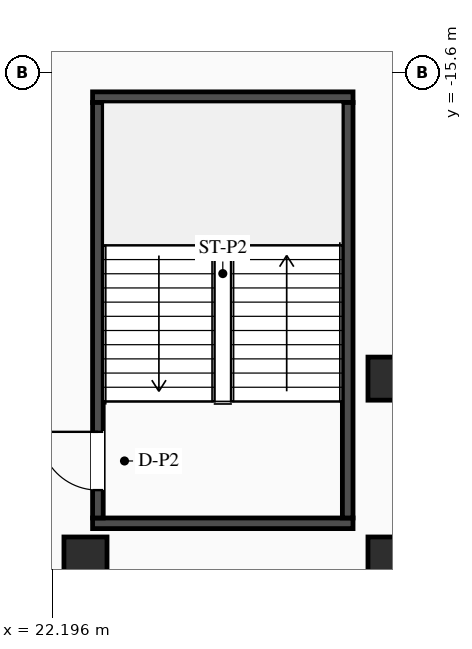
"""IFC4 building model, lengths in metres.
Left out: names, types, materials, properties, quantities, classifications, styles, units other than length and angle.
Written with IfcOpenShell. Run it as: python <this file> out.ifc"""

import sys

from ifc_helpers import new_model, si_unit, direction, frame, frame_2d, origin, origin_2d, place, context, subcontext, project, spatial, rectangle, i_section, extrude, element, fill, save


model = new_model("IFC4")
c1 = context("Model", 3, precision=1e-05, world=origin(), true_north=direction((0.0, 1.0)))
c2 = subcontext(c1, "Body", "Model", "MODEL_VIEW")
j1 = project(units=[si_unit("LENGTHUNIT", "METRE"), si_unit("PLANEANGLEUNIT", "RADIAN")], contexts=[c1])
p1 = place(None, origin())
s1 = spatial("IfcSite", under=j1, at=p1, CompositionType="ELEMENT")
p2 = place(p1, origin())
s2 = spatial("IfcBuilding", under=s1, at=p2, CompositionType="ELEMENT")
p3 = place(p2, frame((0.0, 0.0, 5.1)))
s3 = spatial("IfcBuildingStorey", under=s2, at=p3, CompositionType="ELEMENT", Elevation=5.1)
for number, where, z_axis, x_axis in (
    (1, (22.99, -24.505, 0.0), (0.0, 0.0, 1.0), (1.0, 0.0, 0.0)),
    (2, (22.99, -16.095, 0.0), (0.0, 0.0, 1.0), (1.0, 0.0, 0.0)),
):
    element("IfcWall", number, at=place(p3, frame(where, z_axis=z_axis, x_axis=x_axis)), inside=s3, PredefinedType="SHEAR", context=c2, shape_type="SweptSolid", body=[
        extrude(rectangle(XDim=5.14, YDim=0.21, at=frame_2d((2.57, 0.0))), origin(), (0.0, 0.0, 1.0), 4.25),
    ])
p4 = place(p3, frame((23.095, -24.4, 0.0), z_axis=(0.0, 0.0, 1.0), x_axis=(0.0, 1.0, 0.0)))
e3 = element("IfcWall", 3, at=p4, inside=s3, PredefinedType="SHEAR", context=c2, shape_type="SweptSolid", body=[
    extrude(rectangle(XDim=8.2, YDim=0.21, at=frame_2d((4.1, 0.0))), origin(), (0.0, 0.0, 1.0), 4.25),
])
p5 = place(p4, frame((0.55, 0.0, 0.0)))
e4 = element("IfcOpeningElement", 4, at=p5, cuts=e3, PredefinedType="OPENING", context=c2, shape_type="SweptSolid", body=[
    extrude(rectangle(XDim=1.15, YDim=2.1, at=frame_2d((0.575, 1.05))), frame((0.0, 0.115, 0.0), z_axis=(0.0, -1.0, 0.0), x_axis=(1.0, 0.0, 0.0)), (0.0, 0.0, 1.0), 0.23),
])
p6 = place(p3, frame((28.025, -24.4, 0.0), z_axis=(0.0, 0.0, 1.0), x_axis=(0.0, 1.0, 0.0)))
e5 = element("IfcWall", 5, at=p6, inside=s3, PredefinedType="SHEAR", context=c2, shape_type="SweptSolid", body=[
    extrude(rectangle(XDim=8.2, YDim=0.21, at=frame_2d((4.1, 0.0))), origin(), (0.0, 0.0, 1.0), 4.25),
])
for number, where, z_axis, x_axis in (
    (6, (28.85, -21.65, 0.0), (0.0, 0.0, 1.0), (1.0, 0.0, 0.0)),
    (7, (22.85, -25.2, 0.0), (0.0, 0.0, 1.0), (1.0, 0.0, 0.0)),
    (8, (28.85, -25.2, 0.0), (0.0, 0.0, 1.0), (1.0, 0.0, 0.0)),
):
    element("IfcColumn", number, at=place(p3, frame(where, z_axis=z_axis, x_axis=x_axis)), inside=s3, PredefinedType="COLUMN", context=c2, shape_type="SweptSolid", body=[
        extrude(i_section(OverallWidth=0.85, OverallDepth=0.85, WebThickness=0.032, FlangeThickness=0.048, at=origin_2d()), origin(), (0.0, 0.0, 1.0), 4.5),
    ])
p7 = place(p5, origin())
e9 = element("IfcDoor", 9, at=p7, inside=s3, OperationType="SINGLE_SWING_RIGHT", PredefinedType="DOOR", context=c2, shape_type="SweptSolid", body=[
    extrude(rectangle(XDim=1.15, YDim=2.1, at=frame_2d((0.575, 1.05))), frame((0.0, 0.025, 0.0), z_axis=(0.0, -1.0, 0.0), x_axis=(1.0, 0.0, 0.0)), (0.0, 0.0, 1.0), 0.05),
])
fill(e4, e9)
save(model, sys.argv[1])
